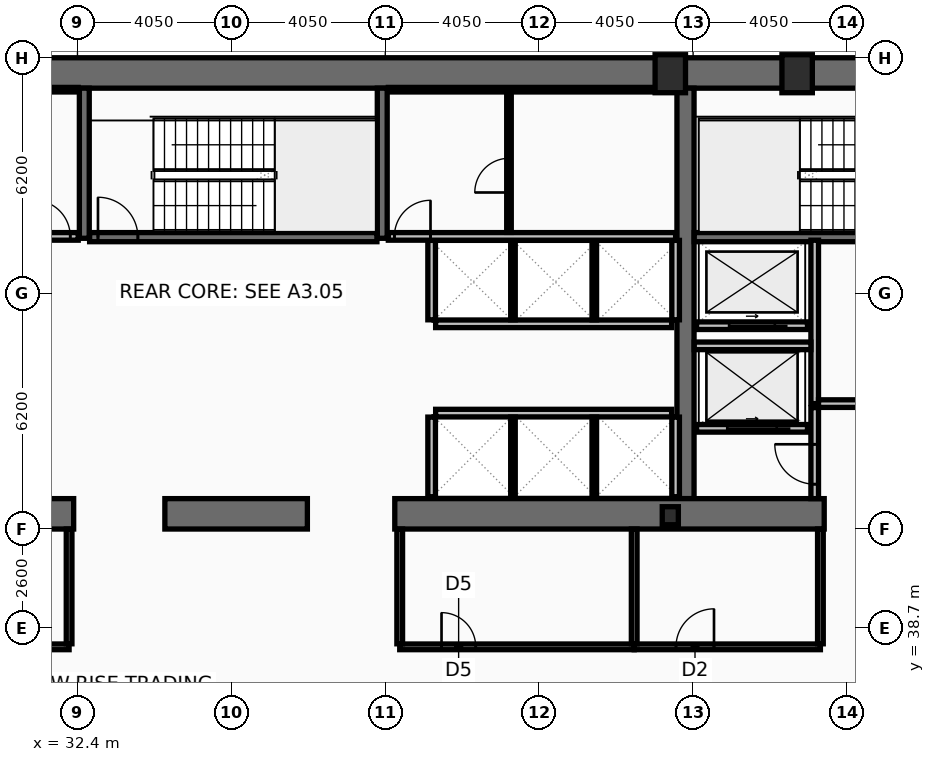
"""IFC4 building model, lengths in metres.
Left out: names, types, materials, properties, quantities, classifications, styles, units other than length and angle.
Written with IfcOpenShell. Run it as: python <this file> out.ifc"""

import sys

from ifc_helpers import new_model, si_unit, direction, frame, frame_2d, origin, origin_2d, place, context, subcontext, project, spatial, rectangle, hollow_rectangle, i_section, extrude, element, fill, save


model = new_model("IFC4")
c1 = context("Model", 3, precision=1e-05, world=origin(), true_north=direction((0.0, 1.0)))
c2 = subcontext(c1, "Body", "Model", "MODEL_VIEW")
j1 = project(units=[si_unit("LENGTHUNIT", "METRE"), si_unit("PLANEANGLEUNIT", "RADIAN")], contexts=[c1])
p1 = place(None, origin())
s1 = spatial("IfcSite", under=j1, at=p1, CompositionType="ELEMENT")
p2 = place(p1, origin())
s2 = spatial("IfcBuilding", under=s1, at=p2, CompositionType="ELEMENT")
p3 = place(p2, frame((0.0, 0.0, 57.8)))
s3 = spatial("IfcBuildingStorey", under=s2, at=p3, CompositionType="ELEMENT", Elevation=57.8)
p4 = place(p3, frame((16.2, 53.3, 0.0), z_axis=(0.0, 0.0, 1.0), x_axis=(1.0, 0.0, 0.0)))
e1 = element("IfcWall", 1, at=p4, inside=s3, PredefinedType="SHEAR", context=c2, shape_type="SweptSolid", body=[
    extrude(rectangle(XDim=40.5, YDim=0.8, at=frame_2d((20.25, 0.0))), origin(), (0.0, 0.0, 1.0), 3.82),
])
p5 = place(p3, frame((48.4, 42.1, 0.0), z_axis=(0.0, 0.0, 1.0), x_axis=(0.0, 1.0, 0.0)))
e2 = element("IfcWall", 2, at=p5, inside=s3, PredefinedType="SHEAR", context=c2, shape_type="SweptSolid", body=[
    extrude(rectangle(XDim=10.8, YDim=0.45, at=frame_2d((5.4, 0.0))), origin(), (0.0, 0.0, 1.0), 3.82),
])
p6 = place(p3, frame((32.3, 41.7, 0.0), z_axis=(0.0, 0.0, 1.0), x_axis=(-1.0, 0.0, 0.0)))
e3 = element("IfcWall", 3, at=p6, inside=s3, PredefinedType="SHEAR", context=c2, shape_type="SweptSolid", body=[
    extrude(rectangle(XDim=11.45, YDim=0.8, at=frame_2d((5.725, 0.0))), origin(), (0.0, 0.0, 1.0), 3.82),
])
p7 = place(p3, frame((38.45, 41.7, 0.0), z_axis=(0.0, 0.0, 1.0), x_axis=(-1.0, 0.0, 0.0)))
e4 = element("IfcWall", 4, at=p7, inside=s3, PredefinedType="SHEAR", context=c2, shape_type="SweptSolid", body=[
    extrude(rectangle(XDim=3.75, YDim=0.8, at=frame_2d((1.875, 0.0))), origin(), (0.0, 0.0, 1.0), 3.82),
])
p8 = place(p3, frame((52.05, 41.7, 0.0), z_axis=(0.0, 0.0, 1.0), x_axis=(-1.0, 0.0, 0.0)))
e5 = element("IfcWall", 5, at=p8, inside=s3, PredefinedType="SHEAR", context=c2, shape_type="SweptSolid", body=[
    extrude(rectangle(XDim=11.3, YDim=0.8, at=frame_2d((5.65, 0.0))), origin(), (0.0, 0.0, 1.0), 3.82),
])
for number, where, z_axis, x_axis in (
    (6, (32.58, 48.95, 0.0), (0.0, 0.0, 1.0), (0.0, 1.0, 0.0)),
    (7, (40.42, 48.95, 0.0), (0.0, 0.0, 1.0), (0.0, 1.0, 0.0)),
):
    element("IfcWall", number, at=place(p3, frame(where, z_axis=z_axis, x_axis=x_axis)), inside=s3, PredefinedType="SHEAR", context=c2, shape_type="SweptSolid", body=[
        extrude(rectangle(XDim=3.95, YDim=0.26, at=frame_2d((1.975, 0.0))), origin(), (0.0, 0.0, 1.0), 3.82),
    ])
p9 = place(p3, frame((48.63, 48.98, 0.0), z_axis=(0.0, 0.0, 1.0), x_axis=(1.0, 0.0, 0.0)))
e8 = element("IfcWall", 8, at=p9, inside=s3, PredefinedType="SHEAR", context=c2, shape_type="SweptSolid", body=[
    extrude(rectangle(XDim=7.27, YDim=0.24, at=frame_2d((3.635, 0.0))), origin(), (0.0, 0.0, 1.0), 3.82),
])
p10 = place(p9, frame((6.0, 0.0, 0.0)))
e9 = element("IfcOpeningElement", 9, at=p10, cuts=e8, PredefinedType="OPENING", context=c2, shape_type="SweptSolid", body=[
    extrude(rectangle(XDim=1.05, YDim=2.15, at=frame_2d((0.525, 1.075))), frame((0.0, 0.13, 0.0), z_axis=(0.0, -1.0, 0.0), x_axis=(1.0, 0.0, 0.0)), (0.0, 0.0, 1.0), 0.26),
])
p11 = place(p3, frame((32.72, 48.98, 0.0), z_axis=(0.0, 0.0, 1.0), x_axis=(1.0, 0.0, 0.0)))
e10 = element("IfcWall", 10, at=p11, inside=s3, PredefinedType="SHEAR", context=c2, shape_type="SweptSolid", body=[
    extrude(rectangle(XDim=7.56, YDim=0.24, at=frame_2d((3.78, 0.0))), origin(), (0.0, 0.0, 1.0), 3.82),
])
p12 = place(p11, frame((0.22, 0.0, 0.0)))
e11 = element("IfcOpeningElement", 11, at=p12, cuts=e10, PredefinedType="OPENING", context=c2, shape_type="SweptSolid", body=[
    extrude(rectangle(XDim=1.05, YDim=2.15, at=frame_2d((0.525, 1.075))), frame((0.0, 0.13, 0.0), z_axis=(0.0, -1.0, 0.0), x_axis=(1.0, 0.0, 0.0)), (0.0, 0.0, 1.0), 0.26),
])
for number, where, z_axis, x_axis in (
    (12, (48.0, 53.28, 0.0), (0.0, 0.0, 1.0), (1.0, 0.0, 0.0)),
    (13, (51.337, 53.28, 0.0), (0.0, 0.0, 1.0), (1.0, 0.0, 0.0)),
):
    element("IfcColumn", number, at=place(p3, frame(where, z_axis=z_axis, x_axis=x_axis)), inside=s3, PredefinedType="COLUMN", context=c2, shape_type="SweptSolid", body=[
        extrude(hollow_rectangle(XDim=0.8, YDim=1.0, WallThickness=0.055, at=origin_2d()), origin(), (0.0, 0.0, 1.0), 4.0),
    ])
p13 = place(p3, frame((48.0, 41.65, 0.0), z_axis=(0.0, 0.0, 1.0), x_axis=(1.0, 0.0, 0.0)))
e14 = element("IfcColumn", 14, at=p13, inside=s3, PredefinedType="COLUMN", context=c2, shape_type="SweptSolid", body=[
    extrude(i_section(OverallWidth=0.424, OverallDepth=0.474, WebThickness=0.048, FlangeThickness=0.077, at=origin_2d()), origin(), (0.0, 0.0, 1.0), 4.0),
])
p14 = place(p3, frame((51.61, 43.95, 0.0), z_axis=(0.0, 0.0, 1.0), x_axis=(-1.0, 0.0, 0.0)))
e15 = element("IfcWall", 15, at=p14, inside=s3, PredefinedType="PARTITIONING", context=c2, shape_type="SweptSolid", body=[
    extrude(rectangle(XDim=2.92, YDim=0.2, at=frame_2d((1.46, 0.0))), origin(), (0.0, 0.0, 1.0), 3.82),
])
p15 = place(p14, frame((0.81, 0.0, 0.0)))
e16 = element("IfcOpeningElement", 16, at=p15, cuts=e15, PredefinedType="OPENING", context=c2, shape_type="SweptSolid", body=[
    extrude(rectangle(XDim=1.3, YDim=2.18, at=frame_2d((0.65, 1.09))), frame((0.0, 0.11, 0.0), z_axis=(0.0, -1.0, 0.0), x_axis=(1.0, 0.0, 0.0)), (0.0, 0.0, 1.0), 0.22),
])
p16 = place(p3, frame((51.61, 46.65, 0.0), z_axis=(0.0, 0.0, 1.0), x_axis=(-1.0, 0.0, 0.0)))
e17 = element("IfcWall", 17, at=p16, inside=s3, PredefinedType="PARTITIONING", context=c2, shape_type="SweptSolid", body=[
    extrude(rectangle(XDim=2.92, YDim=0.2, at=frame_2d((1.46, 0.0))), origin(), (0.0, 0.0, 1.0), 3.82),
])
p17 = place(p16, frame((0.86, 0.0, 0.0)))
e18 = element("IfcOpeningElement", 18, at=p17, cuts=e17, PredefinedType="OPENING", context=c2, shape_type="SweptSolid", body=[
    extrude(rectangle(XDim=1.2, YDim=2.18, at=frame_2d((0.6, 1.09))), frame((0.0, 0.11, 0.0), z_axis=(0.0, -1.0, 0.0), x_axis=(1.0, 0.0, 0.0)), (0.0, 0.0, 1.0), 0.22),
])
p18 = place(p3, frame((51.8, 44.6, 0.0), z_axis=(0.0, 0.0, 1.0), x_axis=(0.0, 1.0, 0.0)))
e19 = element("IfcWall", 19, at=p18, inside=s3, PredefinedType="PARTITIONING", context=c2, shape_type="SweptSolid", body=[
    extrude(rectangle(XDim=4.3, YDim=0.2, at=frame_2d((2.15, 0.0))), origin(), (0.0, 0.0, 1.0), 3.82),
])
p19 = place(p3, frame((51.9, 44.6, 0.0), z_axis=(0.0, 0.0, 1.0), x_axis=(1.0, 0.0, 0.0)))
e20 = element("IfcWall", 20, at=p19, inside=s3, PredefinedType="PARTITIONING", context=c2, shape_type="SweptSolid", body=[
    extrude(rectangle(XDim=4.0, YDim=0.2, at=frame_2d((2.0, 0.0))), origin(), (0.0, 0.0, 1.0), 3.82),
])
p20 = place(p19, frame((1.15, 0.0, 0.0)))
e21 = element("IfcOpeningElement", 21, at=p20, cuts=e20, PredefinedType="OPENING", context=c2, shape_type="SweptSolid", body=[
    extrude(rectangle(XDim=1.05, YDim=2.15, at=frame_2d((0.525, 1.075))), frame((0.0, 0.11, 0.0), z_axis=(0.0, -1.0, 0.0), x_axis=(1.0, 0.0, 0.0)), (0.0, 0.0, 1.0), 0.22),
])
p21 = place(p3, frame((48.63, 46.12, 0.0), z_axis=(0.0, 0.0, 1.0), x_axis=(1.0, 0.0, 0.0)))
e22 = element("IfcWall", 22, at=p21, inside=s3, PredefinedType="PARTITIONING", context=c2, shape_type="SweptSolid", body=[
    extrude(rectangle(XDim=3.07, YDim=0.2, at=frame_2d((1.535, 0.0))), origin(), (0.0, 0.0, 1.0), 3.82),
])
p22 = place(p3, frame((51.8, 42.1, 0.0), z_axis=(0.0, 0.0, 1.0), x_axis=(0.0, 1.0, 0.0)))
e23 = element("IfcWall", 23, at=p22, inside=s3, PredefinedType="PARTITIONING", context=c2, shape_type="SweptSolid", body=[
    extrude(rectangle(XDim=2.395, YDim=0.2, at=frame_2d((1.198, 0.0))), origin(), (0.0, 0.0, 1.0), 3.82),
])
p23 = place(p22, frame((0.38, 0.0, 0.0)))
e24 = element("IfcOpeningElement", 24, at=p23, cuts=e23, PredefinedType="OPENING", context=c2, shape_type="SweptSolid", body=[
    extrude(rectangle(XDim=1.05, YDim=2.15, at=frame_2d((0.525, 1.075))), frame((0.0, 0.11, 0.0), z_axis=(0.0, -1.0, 0.0), x_axis=(1.0, 0.0, 0.0)), (0.0, 0.0, 1.0), 0.22),
])
p24 = place(p3, frame((41.825, 46.7, 0.0), z_axis=(0.0, 0.0, 1.0), x_axis=(1.0, 0.0, 0.0)))
e25 = element("IfcWall", 25, at=p24, inside=s3, PredefinedType="PARTITIONING", context=c2, shape_type="SweptSolid", body=[
    extrude(rectangle(XDim=6.21, YDim=0.2, at=frame_2d((3.105, 0.0))), origin(), (0.0, 0.0, 1.0), 3.82),
])
for number, where, z_axis, x_axis in (
    (26, (41.72, 46.805, 0.0), (0.0, 0.0, 1.0), (0.0, 1.0, 0.0)),
    (27, (48.14, 46.805, 0.0), (0.0, 0.0, 1.0), (0.0, 1.0, 0.0)),
):
    element("IfcWall", number, at=place(p3, frame(where, z_axis=z_axis, x_axis=x_axis)), inside=s3, PredefinedType="PARTITIONING", context=c2, shape_type="SweptSolid", body=[
        extrude(rectangle(XDim=2.09, YDim=0.2, at=frame_2d((1.045, 0.0))), origin(), (0.0, 0.0, 1.0), 3.82),
    ])
for number, where, z_axis, x_axis in (
    (28, (43.86, 46.805, 0.0), (0.0, 0.0, 1.0), (0.0, 1.0, 0.0)),
    (29, (46.0, 46.805, 0.0), (0.0, 0.0, 1.0), (0.0, 1.0, 0.0)),
):
    element("IfcWall", number, at=place(p3, frame(where, z_axis=z_axis, x_axis=x_axis)), inside=s3, PredefinedType="PARTITIONING", context=c2, shape_type="SweptSolid", body=[
        extrude(rectangle(XDim=2.09, YDim=0.12, at=frame_2d((1.045, 0.0))), origin(), (0.0, 0.0, 1.0), 3.82),
    ])
p25 = place(p3, frame((41.825, 44.35, 0.0), z_axis=(0.0, 0.0, 1.0), x_axis=(1.0, 0.0, 0.0)))
e30 = element("IfcWall", 30, at=p25, inside=s3, PredefinedType="PARTITIONING", context=c2, shape_type="SweptSolid", body=[
    extrude(rectangle(XDim=6.21, YDim=0.2, at=frame_2d((3.105, 0.0))), origin(), (0.0, 0.0, 1.0), 3.82),
])
for number, where, z_axis, x_axis in (
    (31, (41.72, 42.15, 0.0), (0.0, 0.0, 1.0), (0.0, 1.0, 0.0)),
    (32, (48.14, 42.15, 0.0), (0.0, 0.0, 1.0), (0.0, 1.0, 0.0)),
):
    element("IfcWall", number, at=place(p3, frame(where, z_axis=z_axis, x_axis=x_axis)), inside=s3, PredefinedType="PARTITIONING", context=c2, shape_type="SweptSolid", body=[
        extrude(rectangle(XDim=2.095, YDim=0.2, at=frame_2d((1.048, 0.0))), origin(), (0.0, 0.0, 1.0), 3.82),
    ])
for number, where, z_axis, x_axis in (
    (33, (43.86, 42.15, 0.0), (0.0, 0.0, 1.0), (0.0, 1.0, 0.0)),
    (34, (46.0, 42.15, 0.0), (0.0, 0.0, 1.0), (0.0, 1.0, 0.0)),
):
    element("IfcWall", number, at=place(p3, frame(where, z_axis=z_axis, x_axis=x_axis)), inside=s3, PredefinedType="PARTITIONING", context=c2, shape_type="SweptSolid", body=[
        extrude(rectangle(XDim=2.095, YDim=0.12, at=frame_2d((1.048, 0.0))), origin(), (0.0, 0.0, 1.0), 3.82),
    ])
p26 = place(p3, frame((24.7, 52.86, 0.0), z_axis=(0.0, 0.0, 1.0), x_axis=(1.0, 0.0, 0.0)))
e35 = element("IfcWall", 35, at=p26, inside=s3, PredefinedType="PARTITIONING", context=c2, shape_type="SweptSolid", body=[
    extrude(rectangle(XDim=7.72, YDim=0.12, at=frame_2d((3.86, 0.0))), origin(), (0.0, 0.0, 1.0), 3.82),
])
p27 = place(p3, frame((24.7, 49.0, 0.0), z_axis=(0.0, 0.0, 1.0), x_axis=(1.0, 0.0, 0.0)))
e36 = element("IfcWall", 36, at=p27, inside=s3, PredefinedType="PARTITIONING", context=c2, shape_type="SweptSolid", body=[
    extrude(rectangle(XDim=7.72, YDim=0.2, at=frame_2d((3.86, 0.0))), origin(), (0.0, 0.0, 1.0), 3.82),
])
p28 = place(p27, frame((6.56, 0.0, 0.0)))
e37 = element("IfcOpeningElement", 37, at=p28, cuts=e36, PredefinedType="OPENING", context=c2, shape_type="SweptSolid", body=[
    extrude(rectangle(XDim=0.95, YDim=2.1, at=frame_2d((0.475, 1.05))), frame((0.0, 0.11, 0.0), z_axis=(0.0, -1.0, 0.0), x_axis=(1.0, 0.0, 0.0)), (0.0, 0.0, 1.0), 0.22),
])
p29 = place(p3, frame((40.58, 52.86, 0.0), z_axis=(0.0, 0.0, 1.0), x_axis=(1.0, 0.0, 0.0)))
e38 = element("IfcWall", 38, at=p29, inside=s3, PredefinedType="PARTITIONING", context=c2, shape_type="SweptSolid", body=[
    extrude(rectangle(XDim=7.56, YDim=0.12, at=frame_2d((3.78, 0.0))), origin(), (0.0, 0.0, 1.0), 3.82),
])
p30 = place(p3, frame((40.58, 49.0, 0.0), z_axis=(0.0, 0.0, 1.0), x_axis=(1.0, 0.0, 0.0)))
e39 = element("IfcWall", 39, at=p30, inside=s3, PredefinedType="PARTITIONING", context=c2, shape_type="SweptSolid", body=[
    extrude(rectangle(XDim=7.56, YDim=0.2, at=frame_2d((3.78, 0.0))), origin(), (0.0, 0.0, 1.0), 3.82),
])
p31 = place(p30, frame((0.16, 0.0, 0.0)))
e40 = element("IfcOpeningElement", 40, at=p31, cuts=e39, PredefinedType="OPENING", context=c2, shape_type="SweptSolid", body=[
    extrude(rectangle(XDim=0.95, YDim=2.1, at=frame_2d((0.475, 1.05))), frame((0.0, 0.11, 0.0), z_axis=(0.0, -1.0, 0.0), x_axis=(1.0, 0.0, 0.0)), (0.0, 0.0, 1.0), 0.22),
])
p32 = place(p3, frame((43.755, 49.105, 0.0), z_axis=(0.0, 0.0, 1.0), x_axis=(0.0, 1.0, 0.0)))
e41 = element("IfcWall", 41, at=p32, inside=s3, PredefinedType="PARTITIONING", context=c2, shape_type="SweptSolid", body=[
    extrude(rectangle(XDim=3.69, YDim=0.12, at=frame_2d((1.845, 0.0))), origin(), (0.0, 0.0, 1.0), 3.82),
])
p33 = place(p32, frame((1.05, 0.0, 0.0)))
e42 = element("IfcOpeningElement", 42, at=p33, cuts=e41, PredefinedType="OPENING", context=c2, shape_type="SweptSolid", body=[
    extrude(rectangle(XDim=0.9, YDim=2.05, at=frame_2d((0.45, 1.025))), frame((0.0, 0.07, 0.0), z_axis=(0.0, -1.0, 0.0), x_axis=(1.0, 0.0, 0.0)), (0.0, 0.0, 1.0), 0.14),
])
p34 = place(p3, frame((28.8, 38.2, 0.0), z_axis=(0.0, 0.0, 1.0), x_axis=(1.0, 0.0, 0.0)))
e43 = element("IfcWall", 43, at=p34, inside=s3, PredefinedType="PARTITIONING", context=c2, shape_type="SweptSolid", body=[
    extrude(rectangle(XDim=3.38, YDim=0.15, at=frame_2d((1.69, 0.0))), origin(), (0.0, 0.0, 1.0), 3.01),
])
p35 = place(p34, frame((0.7, 0.0, 0.0)))
e44 = element("IfcOpeningElement", 44, at=p35, cuts=e43, PredefinedType="OPENING", context=c2, shape_type="SweptSolid", body=[
    extrude(rectangle(XDim=0.95, YDim=2.05, at=frame_2d((0.475, 1.025))), frame((0.0, 0.085, 0.0), z_axis=(0.0, -1.0, 0.0), x_axis=(1.0, 0.0, 0.0)), (0.0, 0.0, 1.0), 0.17),
])
p36 = place(p3, frame((32.18, 38.28, 0.0), z_axis=(0.0, 0.0, 1.0), x_axis=(0.0, 1.0, 0.0)))
e45 = element("IfcWall", 45, at=p36, inside=s3, PredefinedType="PARTITIONING", context=c2, shape_type="SweptSolid", body=[
    extrude(rectangle(XDim=3.02, YDim=0.15, at=frame_2d((1.51, 0.0))), origin(), (0.0, 0.0, 1.0), 3.82),
])
p37 = place(p3, frame((40.88, 38.2, 0.0), z_axis=(0.0, 0.0, 1.0), x_axis=(1.0, 0.0, 0.0)))
e46 = element("IfcWall", 46, at=p37, inside=s3, PredefinedType="PARTITIONING", context=c2, shape_type="SweptSolid", body=[
    extrude(rectangle(XDim=6.17, YDim=0.15, at=frame_2d((3.085, 0.0))), origin(), (0.0, 0.0, 1.0), 3.01),
])
p38 = place(p37, frame((1.1, 0.0, 0.0)))
e47 = element("IfcOpeningElement", 47, at=p38, cuts=e46, PredefinedType="OPENING", context=c2, shape_type="SweptSolid", body=[
    extrude(rectangle(XDim=0.9, YDim=2.05, at=frame_2d((0.45, 1.025))), frame((0.0, 0.085, 0.0), z_axis=(0.0, -1.0, 0.0), x_axis=(1.0, 0.0, 0.0)), (0.0, 0.0, 1.0), 0.17),
])
p39 = place(p3, frame((47.05, 38.2, 0.0), z_axis=(0.0, 0.0, 1.0), x_axis=(1.0, 0.0, 0.0)))
e48 = element("IfcWall", 48, at=p39, inside=s3, PredefinedType="PARTITIONING", context=c2, shape_type="SweptSolid", body=[
    extrude(rectangle(XDim=4.9, YDim=0.15, at=frame_2d((2.45, 0.0))), origin(), (0.0, 0.0, 1.0), 3.01),
])
p40 = place(p39, frame((1.1, 0.0, 0.0)))
e49 = element("IfcOpeningElement", 49, at=p40, cuts=e48, PredefinedType="OPENING", context=c2, shape_type="SweptSolid", body=[
    extrude(rectangle(XDim=1.0, YDim=2.05, at=frame_2d((0.5, 1.025))), frame((0.0, 0.085, 0.0), z_axis=(0.0, -1.0, 0.0), x_axis=(1.0, 0.0, 0.0)), (0.0, 0.0, 1.0), 0.17),
])
for number, where, z_axis, x_axis in (
    (50, (40.88, 38.28, 0.0), (0.0, 0.0, 1.0), (0.0, 1.0, 0.0)),
    (51, (47.05, 38.28, 0.0), (0.0, 0.0, 1.0), (0.0, 1.0, 0.0)),
    (52, (51.95, 38.28, 0.0), (0.0, 0.0, 1.0), (0.0, 1.0, 0.0)),
):
    element("IfcWall", number, at=place(p3, frame(where, z_axis=z_axis, x_axis=x_axis)), inside=s3, PredefinedType="PARTITIONING", context=c2, shape_type="SweptSolid", body=[
        extrude(rectangle(XDim=3.02, YDim=0.15, at=frame_2d((1.51, 0.0))), origin(), (0.0, 0.0, 1.0), 3.82),
    ])
p41 = place(p12, origin())
e53 = element("IfcDoor", 53, at=p41, inside=s3, OperationType="SINGLE_SWING_LEFT", PredefinedType="DOOR", context=c2, shape_type="SweptSolid", body=[
    extrude(rectangle(XDim=1.05, YDim=2.15, at=frame_2d((0.525, 1.075))), frame((0.0, 0.025, 0.0), z_axis=(0.0, -1.0, 0.0), x_axis=(1.0, 0.0, 0.0)), (0.0, 0.0, 1.0), 0.05),
])
fill(e11, e53)
p42 = place(p15, origin())
e54 = element("IfcDoor", 54, at=p42, inside=s3, OperationType="SLIDING_TO_LEFT", PredefinedType="DOOR", context=c2, shape_type="SweptSolid", body=[
    extrude(rectangle(XDim=1.3, YDim=2.18, at=frame_2d((0.65, 1.09))), frame((0.0, 0.025, 0.0), z_axis=(0.0, -1.0, 0.0), x_axis=(1.0, 0.0, 0.0)), (0.0, 0.0, 1.0), 0.05),
])
fill(e16, e54)
p43 = place(p17, origin())
e55 = element("IfcDoor", 55, at=p43, inside=s3, OperationType="SLIDING_TO_LEFT", PredefinedType="DOOR", context=c2, shape_type="SweptSolid", body=[
    extrude(rectangle(XDim=1.2, YDim=2.18, at=frame_2d((0.6, 1.09))), frame((0.0, 0.025, 0.0), z_axis=(0.0, -1.0, 0.0), x_axis=(1.0, 0.0, 0.0)), (0.0, 0.0, 1.0), 0.05),
])
fill(e18, e55)
p44 = place(p23, origin())
e56 = element("IfcDoor", 56, at=p44, inside=s3, OperationType="SINGLE_SWING_RIGHT", PredefinedType="DOOR", context=c2, shape_type="SweptSolid", body=[
    extrude(rectangle(XDim=1.05, YDim=2.15, at=frame_2d((0.525, 1.075))), frame((0.0, 0.025, 0.0), z_axis=(0.0, -1.0, 0.0), x_axis=(1.0, 0.0, 0.0)), (0.0, 0.0, 1.0), 0.05),
])
fill(e24, e56)
p45 = place(p28, origin())
e57 = element("IfcDoor", 57, at=p45, inside=s3, OperationType="SINGLE_SWING_LEFT", PredefinedType="DOOR", context=c2, shape_type="SweptSolid", body=[
    extrude(rectangle(XDim=0.95, YDim=2.1, at=frame_2d((0.475, 1.05))), frame((0.0, 0.025, 0.0), z_axis=(0.0, -1.0, 0.0), x_axis=(1.0, 0.0, 0.0)), (0.0, 0.0, 1.0), 0.05),
])
fill(e37, e57)
p46 = place(p31, origin())
e58 = element("IfcDoor", 58, at=p46, inside=s3, OperationType="SINGLE_SWING_RIGHT", PredefinedType="DOOR", context=c2, shape_type="SweptSolid", body=[
    extrude(rectangle(XDim=0.95, YDim=2.1, at=frame_2d((0.475, 1.05))), frame((0.0, 0.025, 0.0), z_axis=(0.0, -1.0, 0.0), x_axis=(1.0, 0.0, 0.0)), (0.0, 0.0, 1.0), 0.05),
])
fill(e40, e58)
p47 = place(p33, origin())
e59 = element("IfcDoor", 59, at=p47, inside=s3, OperationType="SINGLE_SWING_LEFT", PredefinedType="DOOR", context=c2, shape_type="SweptSolid", body=[
    extrude(rectangle(XDim=0.9, YDim=2.05, at=frame_2d((0.45, 1.025))), frame((0.0, 0.025, 0.0), z_axis=(0.0, -1.0, 0.0), x_axis=(1.0, 0.0, 0.0)), (0.0, 0.0, 1.0), 0.05),
])
fill(e42, e59)
p48 = place(p38, origin())
e60 = element("IfcDoor", 60, at=p48, inside=s3, OperationType="SINGLE_SWING_LEFT", PredefinedType="DOOR", context=c2, shape_type="SweptSolid", body=[
    extrude(rectangle(XDim=0.9, YDim=2.05, at=frame_2d((0.45, 1.025))), frame((0.0, 0.025, 0.0), z_axis=(0.0, -1.0, 0.0), x_axis=(1.0, 0.0, 0.0)), (0.0, 0.0, 1.0), 0.05),
])
fill(e47, e60)
p49 = place(p40, origin())
e61 = element("IfcDoor", 61, at=p49, inside=s3, OperationType="SINGLE_SWING_RIGHT", PredefinedType="DOOR", context=c2, shape_type="SweptSolid", body=[
    extrude(rectangle(XDim=1.0, YDim=2.05, at=frame_2d((0.5, 1.025))), frame((0.0, 0.025, 0.0), z_axis=(0.0, -1.0, 0.0), x_axis=(1.0, 0.0, 0.0)), (0.0, 0.0, 1.0), 0.05),
])
fill(e49, e61)
save(model, sys.argv[1])
